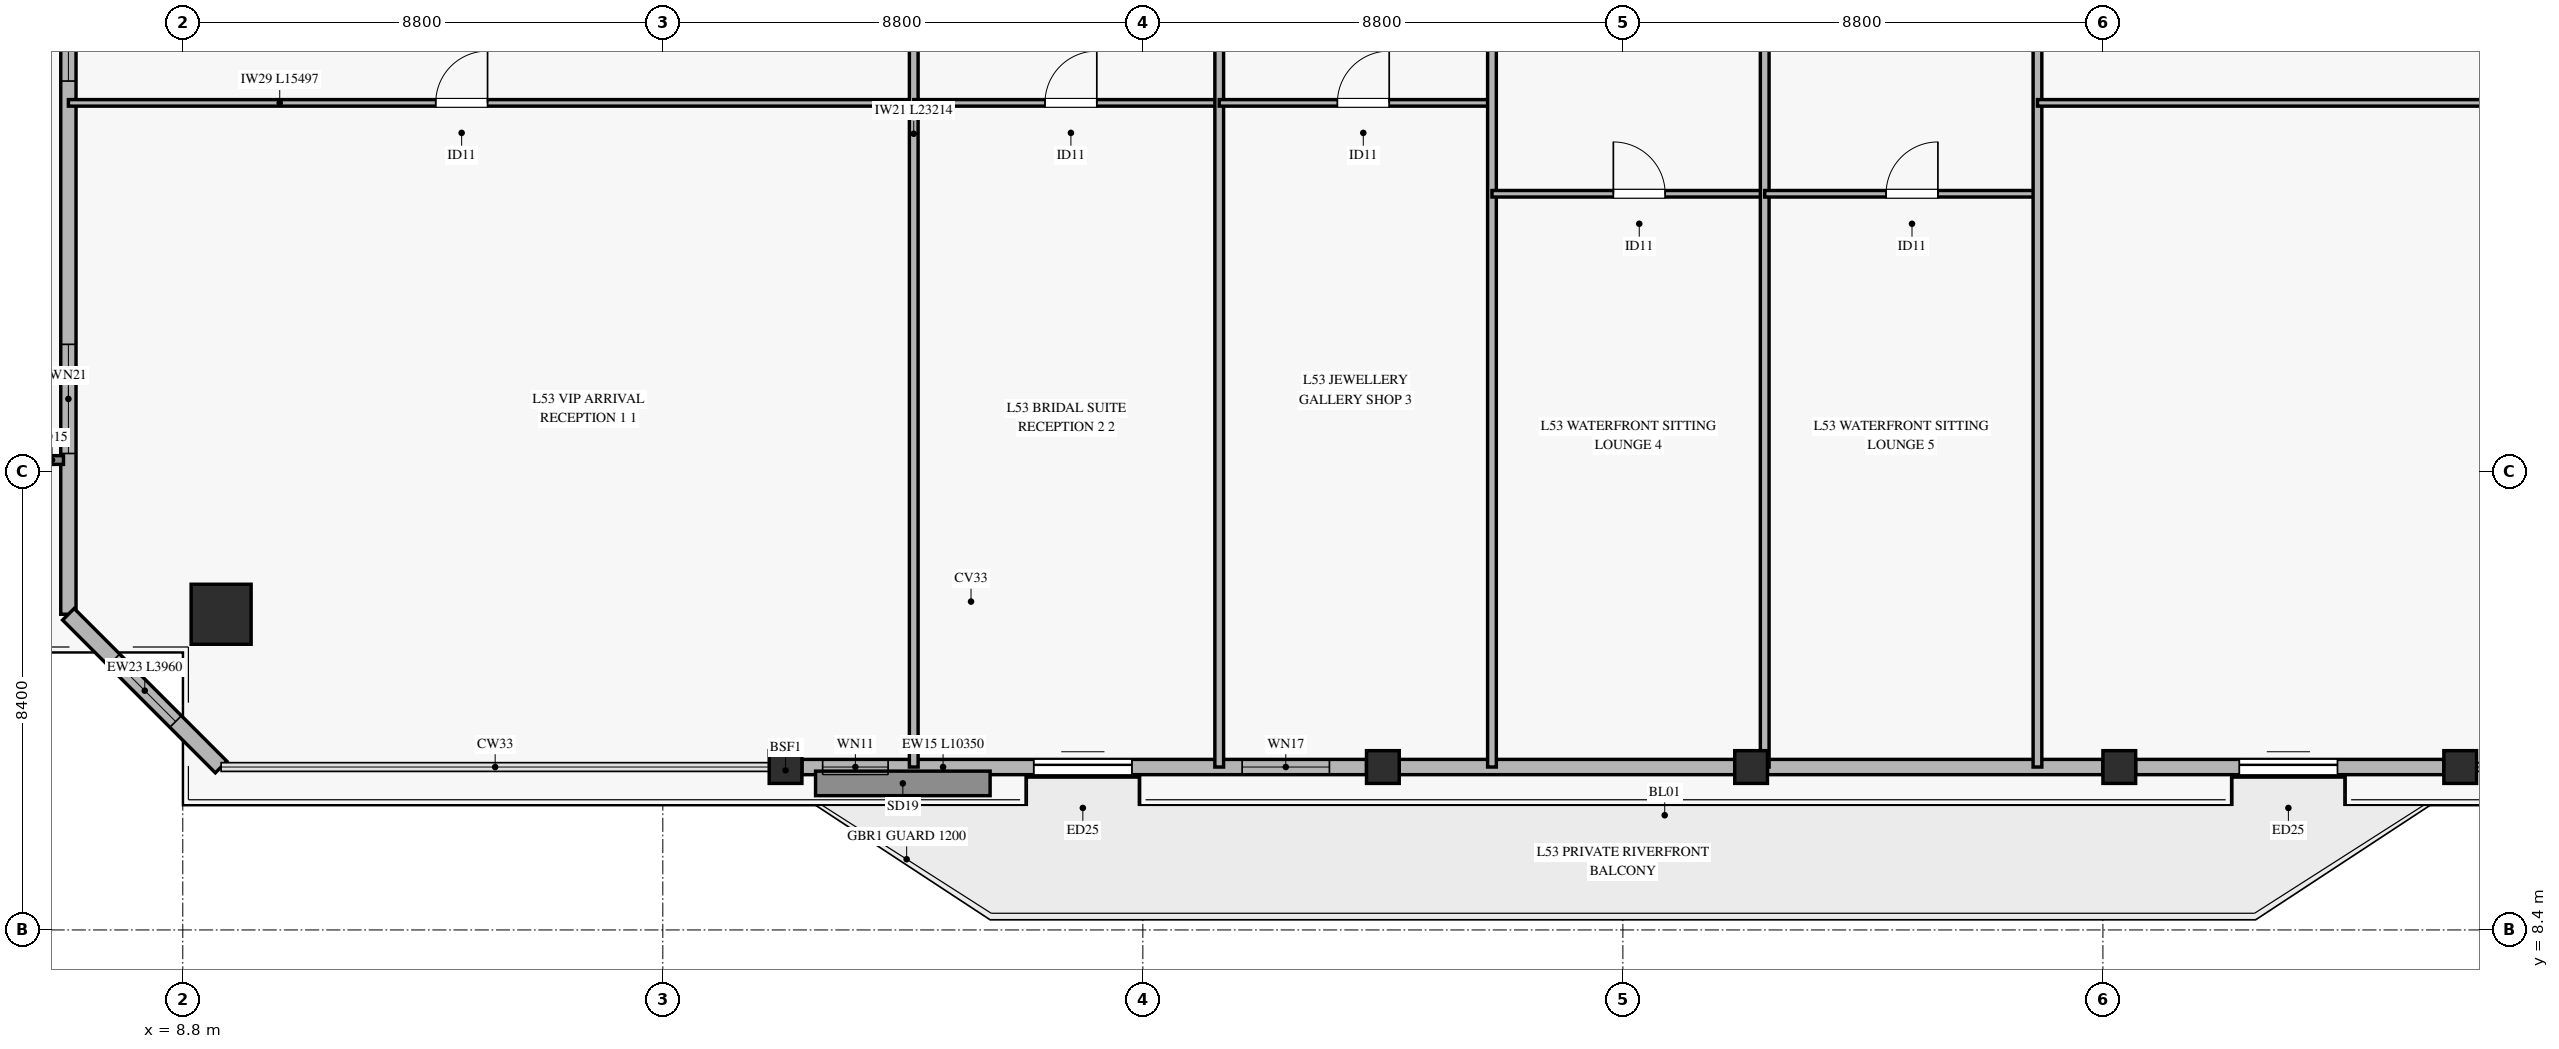
"""IFC4 building model, lengths in metres.
Left out: names, types, materials, properties, quantities, classifications, styles, units other than length and angle.
Written with IfcOpenShell. Run it as: python <this file> out.ifc"""

import sys

from ifc_helpers import new_model, si_unit, direction, frame, frame_2d, origin, origin_2d, place, context, subcontext, project, spatial, rectangle, hollow_rectangle, extrude, source, transform, mapped, element, fill, save


model = new_model("IFC4")
c1 = context("Model", 3, precision=1e-05, world=origin(), true_north=direction((0.0, 1.0)))
c2 = subcontext(c1, "Body", "Model", "MODEL_VIEW")
j1 = project(units=[si_unit("LENGTHUNIT", "METRE"), si_unit("PLANEANGLEUNIT", "RADIAN")], contexts=[c1])
p1 = place(None, origin())
s1 = spatial("IfcSite", under=j1, at=p1, CompositionType="ELEMENT")
p2 = place(p1, origin())
s2 = spatial("IfcBuilding", under=s1, at=p2, CompositionType="ELEMENT")
p3 = place(p2, frame((0.0, 0.0, 209.7)))
s3 = spatial("IfcBuildingStorey", under=s2, at=p3, CompositionType="ELEMENT", Elevation=209.7)
m1 = source(origin(), c2, "Body", "SweptSolid", [
    extrude(hollow_rectangle(XDim=1.1, YDim=1.1, WallThickness=0.05, at=origin_2d()), origin(), (0.0, 0.0, 1.0), 3.408),
])
p4 = place(p3, frame((9.503, 14.186, 0.0), z_axis=(0.108316842256, 0.259974749039, 0.959521021941), x_axis=(-0.923084448442, 0.384597323242, 0.0)))
e1 = element("IfcColumn", 1, at=p4, inside=s3, PredefinedType="COLUMN", context=c2, shape_type="MappedRepresentation", body=[
    mapped(m1, transform((0.0, 0.0, 0.0), x_axis=(1.0, 0.0, 0.0), y_axis=(0.0, 1.0, 0.0), z_axis=(0.0, 0.0, 1.0), scale=1.0)),
])
m2 = source(origin(), c2, "Body", "SweptSolid", [
    extrude(hollow_rectangle(XDim=0.6, YDim=0.6, WallThickness=0.028, at=origin_2d()), origin(), (0.0, 0.0, 1.0), 3.4),
])
for number, where, z_axis, x_axis in (
    (2, (19.85, 11.386, 0.0), (0.0, 0.274, 0.962), (-1.0, 0.0, 0.0)),
    (3, (30.8, 11.386, 0.0), (0.0, 0.274, 0.962), (-1.0, 0.0, 0.0)),
    (4, (37.55, 11.386, 0.0), (0.0, 0.274, 0.962), (-1.0, 0.0, 0.0)),
    (5, (44.3, 11.386, 0.0), (0.0, 0.274, 0.962), (-1.0, 0.0, 0.0)),
    (6, (50.55, 11.386, 0.0), (0.0, 0.274, 0.962), (-1.0, 0.0, 0.0)),
):
    element("IfcColumn", number, at=place(p3, frame(where, z_axis=z_axis, x_axis=x_axis)), inside=s3, PredefinedType="COLUMN", context=c2, shape_type="MappedRepresentation", body=[
        mapped(m2, transform((0.0, 0.0, 0.0), x_axis=(1.0, 0.0, 0.0), y_axis=(0.0, 1.0, 0.0), z_axis=(0.0, 0.0, 1.0), scale=1.0)),
    ])
p5 = place(p3, frame((20.15, 11.386, 0.0), z_axis=(0.0, 0.0, 1.0), x_axis=(1.0, 0.0, 0.0)))
e7 = element("IfcWall", 7, at=p5, inside=s3, PredefinedType="SOLIDWALL", context=c2, shape_type="SweptSolid", body=[
    extrude(rectangle(XDim=10.35, YDim=0.28, at=frame_2d((5.175, 0.0))), origin(), (0.0, 0.0, 1.0), 2.75),
])
p6 = place(p5, frame((4.25, 0.0, 0.0)))
e8 = element("IfcOpeningElement", 8, at=p6, cuts=e7, PredefinedType="OPENING", context=c2, shape_type="SweptSolid", body=[
    extrude(rectangle(XDim=1.8, YDim=2.25, at=frame_2d((0.9, 1.125))), frame((0.0, 0.15, 0.0), z_axis=(0.0, -1.0, 0.0), x_axis=(1.0, 0.0, 0.0)), (0.0, 0.0, 1.0), 0.3),
])
p7 = place(p5, frame((0.38, 0.0, 0.45)))
e9 = element("IfcOpeningElement", 9, at=p7, cuts=e7, PredefinedType="OPENING", context=c2, shape_type="SweptSolid", body=[
    extrude(rectangle(XDim=1.2, YDim=2.0, at=frame_2d((0.6, 1.0))), frame((0.0, 0.15, 0.0), z_axis=(0.0, -1.0, 0.0), x_axis=(1.0, 0.0, 0.0)), (0.0, 0.0, 1.0), 0.3),
])
p8 = place(p5, frame((8.07, 0.0, 0.45)))
e10 = element("IfcOpeningElement", 10, at=p8, cuts=e7, PredefinedType="OPENING", context=c2, shape_type="SweptSolid", body=[
    extrude(rectangle(XDim=1.6, YDim=2.0, at=frame_2d((0.8, 1.0))), frame((0.0, 0.15, 0.0), z_axis=(0.0, -1.0, 0.0), x_axis=(1.0, 0.0, 0.0)), (0.0, 0.0, 1.0), 0.3),
])
for number, where, z_axis, x_axis in (
    (11, (31.1, 11.386, 0.0), (0.0, 0.0, 1.0), (1.0, 0.0, 0.0)),
    (12, (37.85, 11.386, 0.0), (0.0, 0.0, 1.0), (1.0, 0.0, 0.0)),
):
    element("IfcWall", number, at=place(p3, frame(where, z_axis=z_axis, x_axis=x_axis)), inside=s3, PredefinedType="SOLIDWALL", context=c2, shape_type="SweptSolid", body=[
        extrude(rectangle(XDim=6.15, YDim=0.28, at=frame_2d((3.075, 0.0))), origin(), (0.0, 0.0, 1.0), 2.75),
    ])
p9 = place(p3, frame((44.6, 11.386, 0.0), z_axis=(0.0, 0.0, 1.0), x_axis=(1.0, 0.0, 0.0)))
e13 = element("IfcWall", 13, at=p9, inside=s3, PredefinedType="SOLIDWALL", context=c2, shape_type="SweptSolid", body=[
    extrude(rectangle(XDim=5.65, YDim=0.28, at=frame_2d((2.825, 0.0))), origin(), (0.0, 0.0, 1.0), 2.75),
])
p10 = place(p9, frame((1.9, 0.0, 0.0)))
e14 = element("IfcOpeningElement", 14, at=p10, cuts=e13, PredefinedType="OPENING", context=c2, shape_type="SweptSolid", body=[
    extrude(rectangle(XDim=1.8, YDim=2.25, at=frame_2d((0.9, 1.125))), frame((0.0, 0.15, 0.0), z_axis=(0.0, -1.0, 0.0), x_axis=(1.0, 0.0, 0.0)), (0.0, 0.0, 1.0), 0.3),
])
p11 = place(p3, frame((6.703, 14.186, 0.0), z_axis=(0.0, 0.0, 1.0), x_axis=(0.0, 1.0, 0.0)))
e15 = element("IfcWall", 15, at=p11, inside=s3, PredefinedType="SOLIDWALL", context=c2, shape_type="SweptSolid", body=[
    extrude(rectangle(XDim=14.257, YDim=0.28, at=frame_2d((7.128, 0.0))), origin(), (0.0, 0.0, 1.0), 2.75),
])
p12 = place(p11, frame((2.947, 0.0, 0.45)))
e16 = element("IfcOpeningElement", 16, at=p12, cuts=e15, PredefinedType="OPENING", context=c2, shape_type="SweptSolid", body=[
    extrude(rectangle(XDim=2.0, YDim=2.0, at=frame_2d((1.0, 1.0))), frame((0.0, 0.15, 0.0), z_axis=(0.0, -1.0, 0.0), x_axis=(1.0, 0.0, 0.0)), (0.0, 0.0, 1.0), 0.3),
])
p13 = place(p11, frame((9.773, 0.0, 0.45)))
e17 = element("IfcOpeningElement", 17, at=p13, cuts=e15, PredefinedType="OPENING", context=c2, shape_type="SweptSolid", body=[
    extrude(rectangle(XDim=2.0, YDim=2.0, at=frame_2d((1.0, 1.0))), frame((0.0, 0.15, 0.0), z_axis=(0.0, -1.0, 0.0), x_axis=(1.0, 0.0, 0.0)), (0.0, 0.0, 1.0), 0.3),
])
p14 = place(p3, frame((6.703, 14.186, 0.0), z_axis=(0.0, 0.0, 1.0), x_axis=(0.707106781187, -0.707106781187, 0.0)))
e18 = element("IfcWall", 18, at=p14, inside=s3, PredefinedType="SOLIDWALL", context=c2, shape_type="SweptSolid", body=[
    extrude(rectangle(XDim=3.96, YDim=0.3, at=frame_2d((1.98, 0.0))), origin(), (0.0, 0.0, 1.0), 2.75),
])
p15 = place(p14, frame((1.18, 0.0, 0.45)))
e19 = element("IfcOpeningElement", 19, at=p15, cuts=e18, PredefinedType="OPENING", context=c2, shape_type="SweptSolid", body=[
    extrude(rectangle(XDim=1.6, YDim=2.0, at=frame_2d((0.8, 1.0))), frame((0.0, 0.16, 0.0), z_axis=(0.0, -1.0, 0.0), x_axis=(1.0, 0.0, 0.0)), (0.0, 0.0, 1.0), 0.32),
])
p16 = place(p3, frame((6.703, 23.559, 0.0), z_axis=(0.0, 0.0, 1.0), x_axis=(1.0, 0.0, 0.0)))
e20 = element("IfcWall", 20, at=p16, inside=s3, PredefinedType="PARTITIONING", context=c2, shape_type="SweptSolid", body=[
    extrude(rectangle(XDim=15.497, YDim=0.12, at=frame_2d((7.749, 0.0))), origin(), (0.0, 0.0, 1.0), 2.455),
])
p17 = place(p16, frame((6.734, 0.0, 0.0)))
e21 = element("IfcOpeningElement", 21, at=p17, cuts=e20, PredefinedType="OPENING", context=c2, shape_type="SweptSolid", body=[
    extrude(rectangle(XDim=0.95, YDim=2.1, at=frame_2d((0.475, 1.05))), frame((0.0, 0.07, 0.0), z_axis=(0.0, -1.0, 0.0), x_axis=(1.0, 0.0, 0.0)), (0.0, 0.0, 1.0), 0.14),
])
p18 = place(p3, frame((22.2, 11.386, 0.0), z_axis=(0.0, 0.0, 1.0), x_axis=(0.0, 1.0, 0.0)))
e22 = element("IfcWall", 22, at=p18, inside=s3, PredefinedType="PARTITIONING", context=c2, shape_type="SweptSolid", body=[
    extrude(rectangle(XDim=23.214, YDim=0.16, at=frame_2d((11.607, 0.0))), origin(), (0.0, 0.0, 1.0), 2.755),
])
p19 = place(p3, frame((22.2, 23.559, 0.0), z_axis=(0.0, 0.0, 1.0), x_axis=(1.0, 0.0, 0.0)))
e23 = element("IfcWall", 23, at=p19, inside=s3, PredefinedType="PARTITIONING", context=c2, shape_type="SweptSolid", body=[
    extrude(rectangle(XDim=5.6, YDim=0.12, at=frame_2d((2.8, 0.0))), origin(), (0.0, 0.0, 1.0), 3.27),
])
p20 = place(p19, frame((2.406, 0.0, 0.0)))
e24 = element("IfcOpeningElement", 24, at=p20, cuts=e23, PredefinedType="OPENING", context=c2, shape_type="SweptSolid", body=[
    extrude(rectangle(XDim=0.95, YDim=2.1, at=frame_2d((0.475, 1.05))), frame((0.0, 0.07, 0.0), z_axis=(0.0, -1.0, 0.0), x_axis=(1.0, 0.0, 0.0)), (0.0, 0.0, 1.0), 0.14),
])
p21 = place(p3, frame((27.8, 11.386, 0.0), z_axis=(0.0, 0.0, 1.0), x_axis=(0.0, 1.0, 0.0)))
e25 = element("IfcWall", 25, at=p21, inside=s3, PredefinedType="PARTITIONING", context=c2, shape_type="SweptSolid", body=[
    extrude(rectangle(XDim=23.214, YDim=0.16, at=frame_2d((11.607, 0.0))), origin(), (0.0, 0.0, 1.0), 2.755),
])
p22 = place(p3, frame((27.8, 23.559, 0.0), z_axis=(0.0, 0.0, 1.0), x_axis=(1.0, 0.0, 0.0)))
e26 = element("IfcWall", 26, at=p22, inside=s3, PredefinedType="PARTITIONING", context=c2, shape_type="SweptSolid", body=[
    extrude(rectangle(XDim=5.0, YDim=0.12, at=frame_2d((2.5, 0.0))), origin(), (0.0, 0.0, 1.0), 2.455),
])
p23 = place(p22, frame((2.166, 0.0, 0.0)))
e27 = element("IfcOpeningElement", 27, at=p23, cuts=e26, PredefinedType="OPENING", context=c2, shape_type="SweptSolid", body=[
    extrude(rectangle(XDim=0.95, YDim=2.1, at=frame_2d((0.475, 1.05))), frame((0.0, 0.07, 0.0), z_axis=(0.0, -1.0, 0.0), x_axis=(1.0, 0.0, 0.0)), (0.0, 0.0, 1.0), 0.14),
])
p24 = place(p3, frame((32.8, 11.386, 0.0), z_axis=(0.0, 0.0, 1.0), x_axis=(0.0, 1.0, 0.0)))
e28 = element("IfcWall", 28, at=p24, inside=s3, PredefinedType="PARTITIONING", context=c2, shape_type="SweptSolid", body=[
    extrude(rectangle(XDim=23.214, YDim=0.16, at=frame_2d((11.607, 0.0))), origin(), (0.0, 0.0, 1.0), 2.755),
])
p25 = place(p3, frame((32.8, 21.893, 0.0), z_axis=(0.0, 0.0, 1.0), x_axis=(1.0, 0.0, 0.0)))
e29 = element("IfcWall", 29, at=p25, inside=s3, PredefinedType="PARTITIONING", context=c2, shape_type="SweptSolid", body=[
    extrude(rectangle(XDim=5.0, YDim=0.12, at=frame_2d((2.5, 0.0))), origin(), (0.0, 0.0, 1.0), 2.455),
])
p26 = place(p25, frame((2.225, 0.0, 0.0)))
e30 = element("IfcOpeningElement", 30, at=p26, cuts=e29, PredefinedType="OPENING", context=c2, shape_type="SweptSolid", body=[
    extrude(rectangle(XDim=0.95, YDim=2.1, at=frame_2d((0.475, 1.05))), frame((0.0, 0.07, 0.0), z_axis=(0.0, -1.0, 0.0), x_axis=(1.0, 0.0, 0.0)), (0.0, 0.0, 1.0), 0.14),
])
p27 = place(p3, frame((37.8, 11.386, 0.0), z_axis=(0.0, 0.0, 1.0), x_axis=(0.0, 1.0, 0.0)))
e31 = element("IfcWall", 31, at=p27, inside=s3, PredefinedType="PARTITIONING", context=c2, shape_type="SweptSolid", body=[
    extrude(rectangle(XDim=23.214, YDim=0.16, at=frame_2d((11.607, 0.0))), origin(), (0.0, 0.0, 1.0), 2.455),
])
p28 = place(p3, frame((37.8, 21.893, 0.0), z_axis=(0.0, 0.0, 1.0), x_axis=(1.0, 0.0, 0.0)))
e32 = element("IfcWall", 32, at=p28, inside=s3, PredefinedType="PARTITIONING", context=c2, shape_type="SweptSolid", body=[
    extrude(rectangle(XDim=5.0, YDim=0.12, at=frame_2d((2.5, 0.0))), origin(), (0.0, 0.0, 1.0), 3.27),
])
p29 = place(p28, frame((2.225, 0.0, 0.0)))
e33 = element("IfcOpeningElement", 33, at=p29, cuts=e32, PredefinedType="OPENING", context=c2, shape_type="SweptSolid", body=[
    extrude(rectangle(XDim=0.95, YDim=2.1, at=frame_2d((0.475, 1.05))), frame((0.0, 0.07, 0.0), z_axis=(0.0, -1.0, 0.0), x_axis=(1.0, 0.0, 0.0)), (0.0, 0.0, 1.0), 0.14),
])
p30 = place(p3, frame((42.8, 11.386, 0.0), z_axis=(0.0, 0.0, 1.0), x_axis=(0.0, 1.0, 0.0)))
e34 = element("IfcWall", 34, at=p30, inside=s3, PredefinedType="PARTITIONING", context=c2, shape_type="SweptSolid", body=[
    extrude(rectangle(XDim=23.214, YDim=0.16, at=frame_2d((11.607, 0.0))), origin(), (0.0, 0.0, 1.0), 2.755),
])
p31 = place(p3, frame((42.8, 23.559, 0.0), z_axis=(0.0, 0.0, 1.0), x_axis=(1.0, 0.0, 0.0)))
e35 = element("IfcWall", 35, at=p31, inside=s3, PredefinedType="PARTITIONING", context=c2, shape_type="SweptSolid", body=[
    extrude(rectangle(XDim=20.898, YDim=0.12, at=frame_2d((10.449, 0.0))), origin(), (0.0, 0.0, 1.0), 2.455),
])
p32 = place(p31, frame((8.279, 0.0, 0.0)))
e36 = element("IfcOpeningElement", 36, at=p32, cuts=e35, PredefinedType="OPENING", context=c2, shape_type="SweptSolid", body=[
    extrude(rectangle(XDim=0.95, YDim=2.1, at=frame_2d((0.475, 1.05))), frame((0.0, 0.07, 0.0), z_axis=(0.0, -1.0, 0.0), x_axis=(1.0, 0.0, 0.0)), (0.0, 0.0, 1.0), 0.14),
])
m3 = source(origin(), c2, "Body", "SweptSolid", [
    extrude(rectangle(XDim=1.8, YDim=2.25, at=frame_2d((0.9, 1.125))), frame((0.0, 0.025, 0.0), z_axis=(0.0, -1.0, 0.0), x_axis=(1.0, 0.0, 0.0)), (0.0, 0.0, 1.0), 0.05),
])
p33 = place(p6, origin())
e37 = element("IfcDoor", 37, at=p33, inside=s3, OperationType="SLIDING_TO_LEFT", PredefinedType="DOOR", context=c2, shape_type="MappedRepresentation", body=[
    mapped(m3, transform((0.0, 0.0, 0.0), x_axis=(1.0, 0.0, 0.0), y_axis=(0.0, 1.0, 0.0), z_axis=(0.0, 0.0, 1.0), scale=1.0)),
])
fill(e8, e37)
m4 = source(origin(), c2, "Body", "SweptSolid", [
    extrude(rectangle(XDim=1.2, YDim=2.0, at=frame_2d((0.6, 1.0))), frame((0.0, 0.03, 0.0), z_axis=(0.0, -1.0, 0.0), x_axis=(1.0, 0.0, 0.0)), (0.0, 0.0, 1.0), 0.06),
])
p34 = place(p7, origin())
e38 = element("IfcWindow", 38, at=p34, inside=s3, PartitioningType="SINGLE_PANEL", PredefinedType="WINDOW", context=c2, shape_type="MappedRepresentation", body=[
    mapped(m4, transform((0.0, 0.0, 0.0), x_axis=(1.0, 0.0, 0.0), y_axis=(0.0, 1.0, 0.0), z_axis=(0.0, 0.0, 1.0), scale=1.0)),
])
fill(e9, e38)
m5 = source(origin(), c2, "Body", "SweptSolid", [
    extrude(rectangle(XDim=1.6, YDim=2.0, at=frame_2d((0.8, 1.0))), frame((0.0, 0.03, 0.0), z_axis=(0.0, -1.0, 0.0), x_axis=(1.0, 0.0, 0.0)), (0.0, 0.0, 1.0), 0.06),
])
p35 = place(p8, origin())
e39 = element("IfcWindow", 39, at=p35, inside=s3, PartitioningType="SINGLE_PANEL", PredefinedType="WINDOW", context=c2, shape_type="MappedRepresentation", body=[
    mapped(m5, transform((0.0, 0.0, 0.0), x_axis=(1.0, 0.0, 0.0), y_axis=(0.0, 1.0, 0.0), z_axis=(0.0, 0.0, 1.0), scale=1.0)),
])
fill(e10, e39)
p36 = place(p10, origin())
e40 = element("IfcDoor", 40, at=p36, inside=s3, OperationType="SLIDING_TO_LEFT", PredefinedType="DOOR", context=c2, shape_type="MappedRepresentation", body=[
    mapped(m3, transform((0.0, 0.0, 0.0), x_axis=(1.0, 0.0, 0.0), y_axis=(0.0, 1.0, 0.0), z_axis=(0.0, 0.0, 1.0), scale=1.0)),
])
fill(e14, e40)
m6 = source(origin(), c2, "Body", "SweptSolid", [
    extrude(rectangle(XDim=2.0, YDim=2.0, at=frame_2d((1.0, 1.0))), frame((0.0, 0.03, 0.0), z_axis=(0.0, -1.0, 0.0), x_axis=(1.0, 0.0, 0.0)), (0.0, 0.0, 1.0), 0.06),
])
p37 = place(p12, origin())
e41 = element("IfcWindow", 41, at=p37, inside=s3, PartitioningType="SINGLE_PANEL", PredefinedType="WINDOW", context=c2, shape_type="MappedRepresentation", body=[
    mapped(m6, transform((0.0, 0.0, 0.0), x_axis=(1.0, 0.0, 0.0), y_axis=(0.0, 1.0, 0.0), z_axis=(0.0, 0.0, 1.0), scale=1.0)),
])
fill(e16, e41)
p38 = place(p13, origin())
e42 = element("IfcWindow", 42, at=p38, inside=s3, PartitioningType="SINGLE_PANEL", PredefinedType="WINDOW", context=c2, shape_type="MappedRepresentation", body=[
    mapped(m6, transform((0.0, 0.0, 0.0), x_axis=(1.0, 0.0, 0.0), y_axis=(0.0, 1.0, 0.0), z_axis=(0.0, 0.0, 1.0), scale=1.0)),
])
fill(e17, e42)
p39 = place(p15, origin())
e43 = element("IfcWindow", 43, at=p39, inside=s3, PartitioningType="SINGLE_PANEL", PredefinedType="WINDOW", context=c2, shape_type="MappedRepresentation", body=[
    mapped(m5, transform((0.0, 0.0, 0.0), x_axis=(1.0, 0.0, 0.0), y_axis=(0.0, 1.0, 0.0), z_axis=(0.0, 0.0, 1.0), scale=1.0)),
])
fill(e19, e43)
m7 = source(origin(), c2, "Body", "SweptSolid", [
    extrude(rectangle(XDim=0.95, YDim=2.1, at=frame_2d((0.475, 1.05))), frame((0.0, 0.025, 0.0), z_axis=(0.0, -1.0, 0.0), x_axis=(1.0, 0.0, 0.0)), (0.0, 0.0, 1.0), 0.05),
])
p40 = place(p17, origin())
e44 = element("IfcDoor", 44, at=p40, inside=s3, OperationType="SINGLE_SWING_RIGHT", PredefinedType="DOOR", context=c2, shape_type="MappedRepresentation", body=[
    mapped(m7, transform((0.0, 0.0, 0.0), x_axis=(1.0, 0.0, 0.0), y_axis=(0.0, 1.0, 0.0), z_axis=(0.0, 0.0, 1.0), scale=1.0)),
])
fill(e21, e44)
p41 = place(p20, origin())
e45 = element("IfcDoor", 45, at=p41, inside=s3, OperationType="SINGLE_SWING_RIGHT", PredefinedType="DOOR", context=c2, shape_type="MappedRepresentation", body=[
    mapped(m7, transform((0.0, 0.0, 0.0), x_axis=(1.0, 0.0, 0.0), y_axis=(0.0, 1.0, 0.0), z_axis=(0.0, 0.0, 1.0), scale=1.0)),
])
fill(e24, e45)
p42 = place(p23, origin())
e46 = element("IfcDoor", 46, at=p42, inside=s3, OperationType="SINGLE_SWING_RIGHT", PredefinedType="DOOR", context=c2, shape_type="MappedRepresentation", body=[
    mapped(m7, transform((0.0, 0.0, 0.0), x_axis=(1.0, 0.0, 0.0), y_axis=(0.0, 1.0, 0.0), z_axis=(0.0, 0.0, 1.0), scale=1.0)),
])
fill(e27, e46)
p43 = place(p26, origin())
e47 = element("IfcDoor", 47, at=p43, inside=s3, OperationType="SINGLE_SWING_LEFT", PredefinedType="DOOR", context=c2, shape_type="MappedRepresentation", body=[
    mapped(m7, transform((0.0, 0.0, 0.0), x_axis=(1.0, 0.0, 0.0), y_axis=(0.0, 1.0, 0.0), z_axis=(0.0, 0.0, 1.0), scale=1.0)),
])
fill(e30, e47)
p44 = place(p29, origin())
e48 = element("IfcDoor", 48, at=p44, inside=s3, OperationType="SINGLE_SWING_RIGHT", PredefinedType="DOOR", context=c2, shape_type="MappedRepresentation", body=[
    mapped(m7, transform((0.0, 0.0, 0.0), x_axis=(1.0, 0.0, 0.0), y_axis=(0.0, 1.0, 0.0), z_axis=(0.0, 0.0, 1.0), scale=1.0)),
])
fill(e33, e48)
save(model, sys.argv[1])
